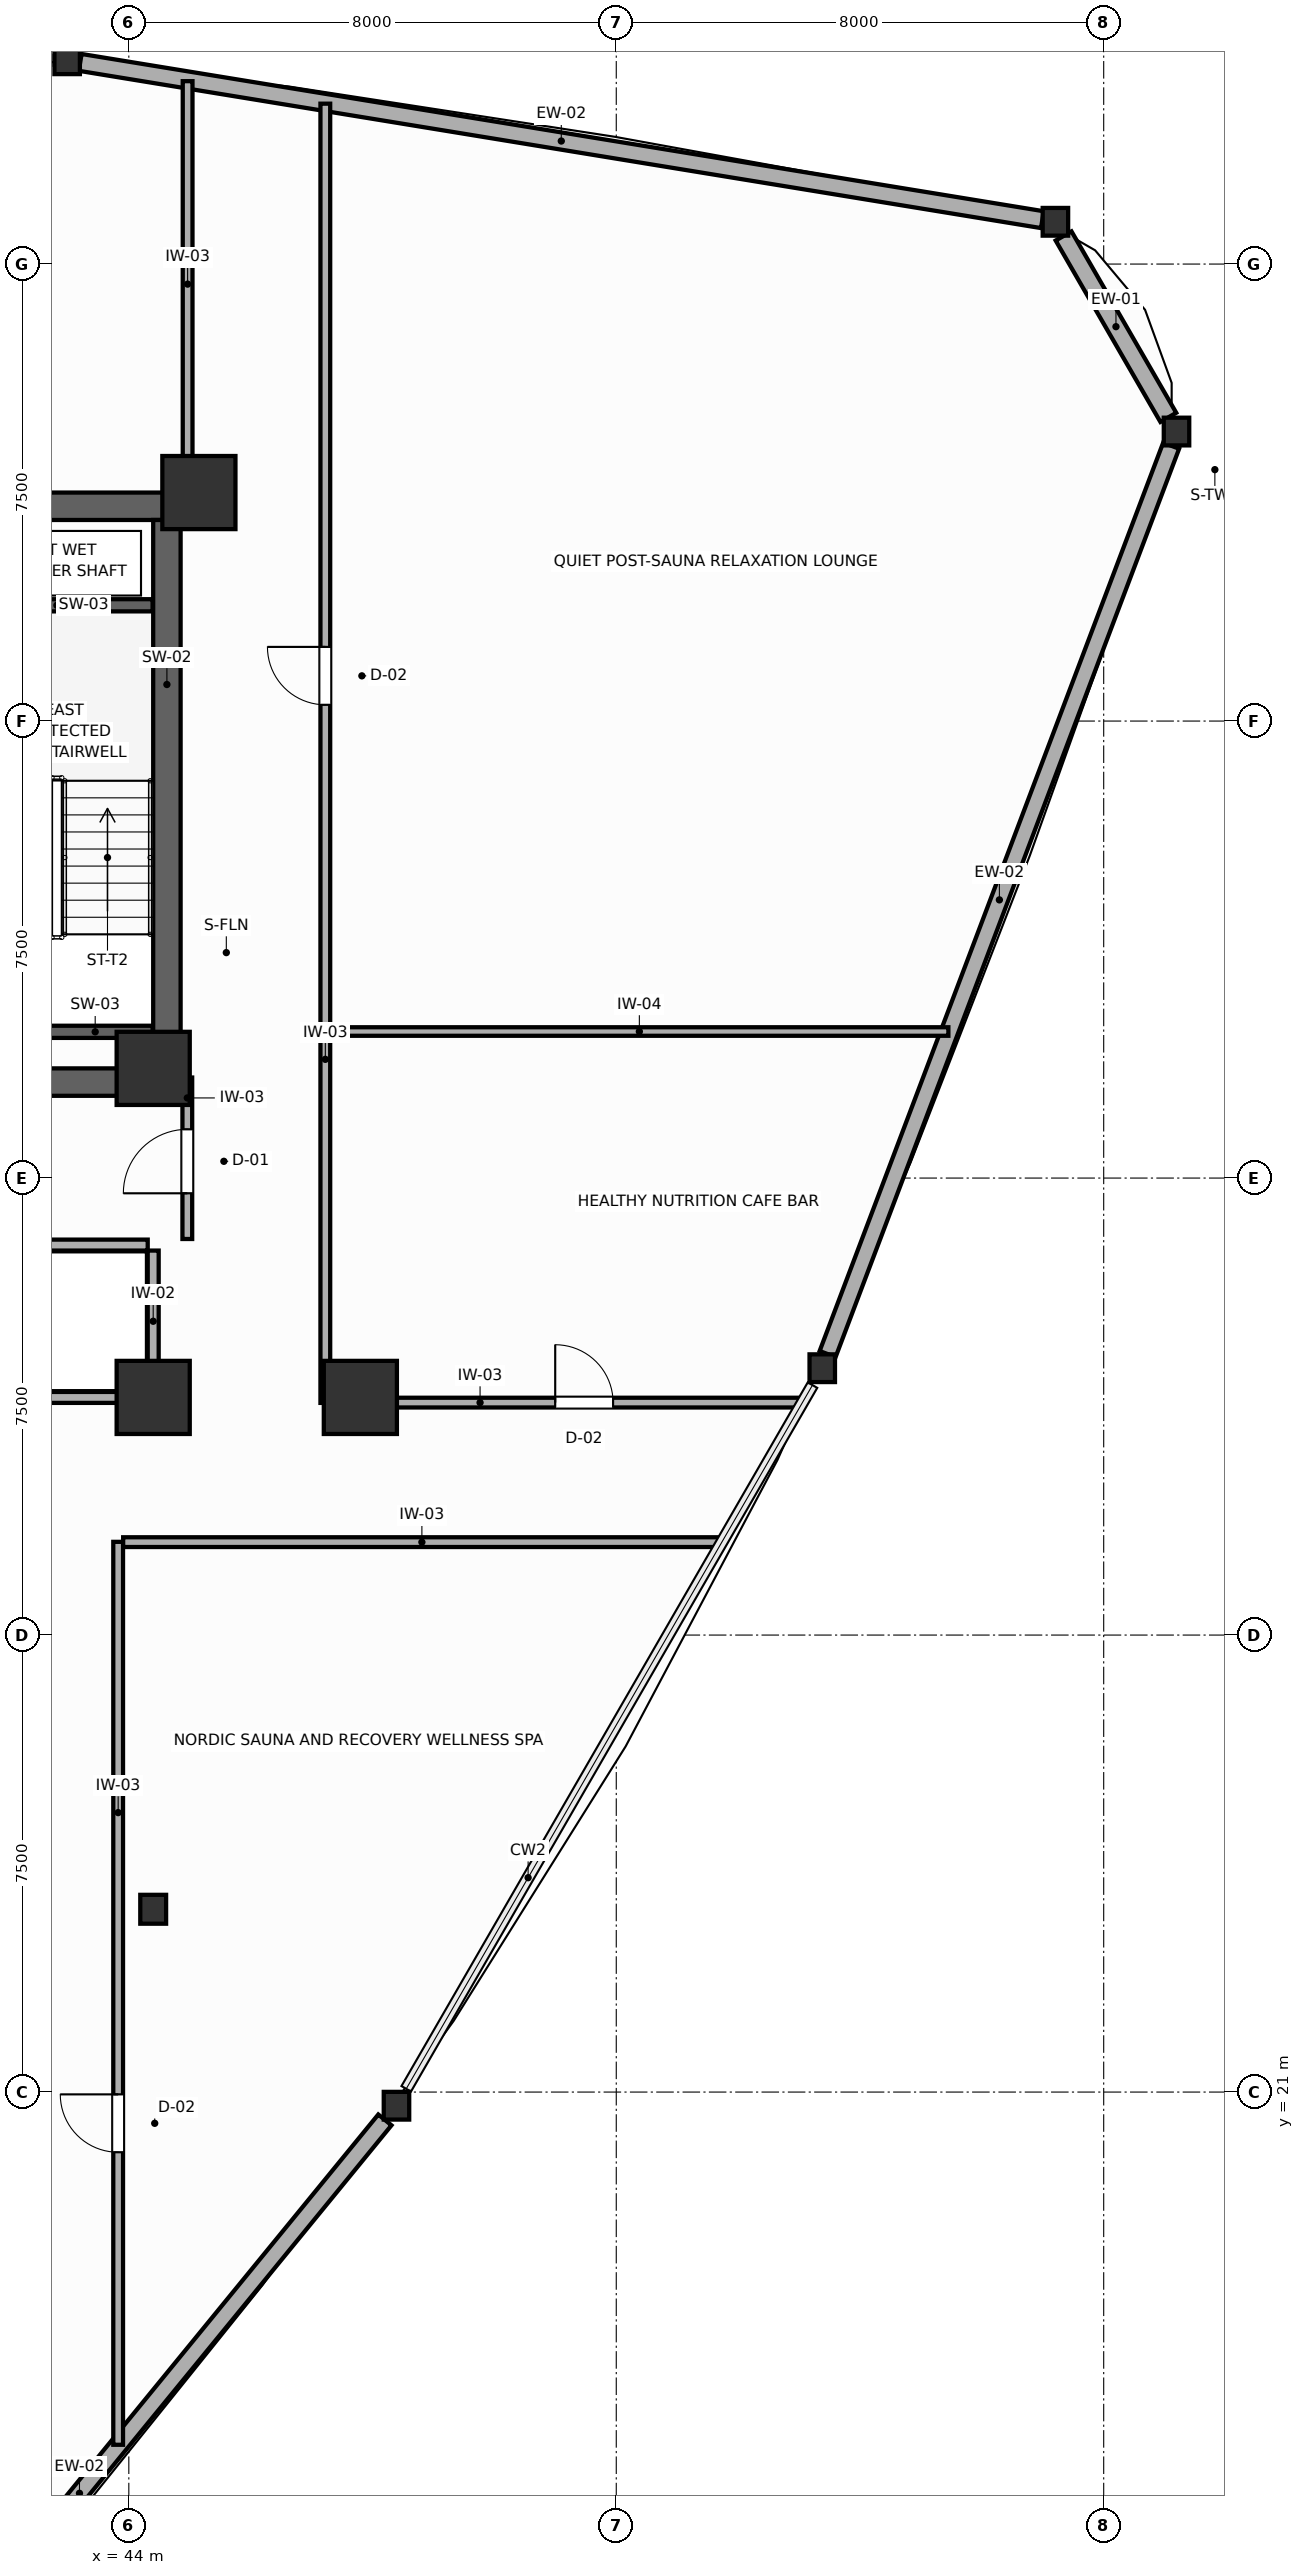
"""IFC4 building model, lengths in metres.
Left out: names, types, materials, properties, quantities, classifications, styles, units other than length and angle.
Written with IfcOpenShell. Run it as: python <this file> out.ifc"""

import sys

from ifc_helpers import new_model, si_unit, direction, frame, frame_2d, origin, origin_2d, place, context, subcontext, project, spatial, rectangle, i_section, extrude, source, transform, mapped, element, fill, save


model = new_model("IFC4")
c1 = context("Model", 3, precision=1e-05, world=origin(), true_north=direction((0.0, 1.0)))
c2 = subcontext(c1, "Body", "Model", "MODEL_VIEW")
j1 = project(units=[si_unit("LENGTHUNIT", "METRE"), si_unit("PLANEANGLEUNIT", "RADIAN")], contexts=[c1])
p1 = place(None, origin())
s1 = spatial("IfcSite", under=j1, at=p1, CompositionType="ELEMENT")
p2 = place(p1, origin())
s2 = spatial("IfcBuilding", under=s1, at=p2, CompositionType="ELEMENT")
p3 = place(p2, frame((0.0, 0.0, 117.0)))
s3 = spatial("IfcBuildingStorey", under=s2, at=p3, CompositionType="ELEMENT", Elevation=117.0)
p4 = place(p3, frame((27.15, 47.025, 0.0), z_axis=(0.0, 0.0, 1.0), x_axis=(1.0, 0.0, 0.0)))
e1 = element("IfcWall", 1, at=p4, inside=s3, PredefinedType="SHEAR", context=c2, shape_type="SweptSolid", body=[
    extrude(rectangle(XDim=17.7, YDim=0.45, at=frame_2d((8.85, 0.0))), origin(), (0.0, 0.0, 1.0), 3.6),
])
p5 = place(p3, frame((27.15, 37.575, 0.0), z_axis=(0.0, 0.0, 1.0), x_axis=(1.0, 0.0, 0.0)))
e2 = element("IfcWall", 2, at=p5, inside=s3, PredefinedType="SHEAR", context=c2, shape_type="SweptSolid", body=[
    extrude(rectangle(XDim=17.7, YDim=0.45, at=frame_2d((8.85, 0.0))), origin(), (0.0, 0.0, 1.0), 3.6),
])
p6 = place(p5, frame((4.875, 0.0, 0.0)))
e3 = element("IfcOpeningElement", 3, at=p6, cuts=e2, PredefinedType="OPENING", context=c2, shape_type="SweptSolid", body=[
    extrude(rectangle(XDim=1.05, YDim=2.1, at=frame_2d((0.525, 1.05))), frame((0.0, 0.235, 0.0), z_axis=(0.0, -1.0, 0.0), x_axis=(1.0, 0.0, 0.0)), (0.0, 0.0, 1.0), 0.47),
])
p7 = place(p5, frame((11.775, 0.0, 0.0)))
e4 = element("IfcOpeningElement", 4, at=p7, cuts=e2, PredefinedType="OPENING", context=c2, shape_type="SweptSolid", body=[
    extrude(rectangle(XDim=1.05, YDim=2.1, at=frame_2d((0.525, 1.05))), frame((0.0, 0.235, 0.0), z_axis=(0.0, -1.0, 0.0), x_axis=(1.0, 0.0, 0.0)), (0.0, 0.0, 1.0), 0.47),
])
p8 = place(p3, frame((44.625, 37.8, 0.0), z_axis=(0.0, 0.0, 1.0), x_axis=(0.0, 1.0, 0.0)))
e5 = element("IfcWall", 5, at=p8, inside=s3, PredefinedType="SHEAR", context=c2, shape_type="SweptSolid", body=[
    extrude(rectangle(XDim=9.0, YDim=0.45, at=frame_2d((4.5, 0.0))), origin(), (0.0, 0.0, 1.0), 3.6),
])
m1 = source(origin(), c2, "Body", "SweptSolid", [
    extrude(rectangle(XDim=1.2, YDim=1.2, at=origin_2d()), origin(), (0.0, 0.0, 1.0), 3.6),
])
for number, where, z_axis, x_axis in (
    (6, (45.15, 47.25, 0.0), (0.0, 0.0, 1.0), (1.0, 0.0, 0.0)),
    (7, (44.4, 37.8, 0.0), (0.0, 0.0, 1.0), (1.0, 0.0, 0.0)),
    (8, (44.4, 32.4, 0.0), (0.0, 0.0, 1.0), (1.0, 0.0, 0.0)),
    (9, (47.8, 32.4, 0.0), (0.0, 0.0, 1.0), (1.0, 0.0, 0.0)),
):
    element("IfcColumn", number, at=place(p3, frame(where, z_axis=z_axis, x_axis=x_axis)), inside=s3, PredefinedType="COLUMN", context=c2, shape_type="MappedRepresentation", body=[
        mapped(m1, transform((0.0, 0.0, 0.0), scale=1.0)),
    ])
m2 = source(origin(), c2, "Body", "SweptSolid", [
    extrude(i_section(OverallWidth=0.424, OverallDepth=0.474, WebThickness=0.045, FlangeThickness=0.072, FilletRadius=0.015, at=origin_2d()), origin(), (0.0, 0.0, 1.0), 3.6),
])
p9 = place(p3, frame((44.4, 24.0, 0.0), z_axis=(0.0, 0.0, 1.0), x_axis=(1.0, 0.0, 0.0)))
e10 = element("IfcColumn", 10, at=p9, inside=s3, PredefinedType="COLUMN", context=c2, shape_type="MappedRepresentation", body=[
    mapped(m2, transform((0.0, 0.0, 0.0), scale=1.0)),
])
m3 = source(origin(), c2, "Body", "SweptSolid", [
    extrude(i_section(OverallWidth=0.418, OverallDepth=0.455, WebThickness=0.039, FlangeThickness=0.063, FilletRadius=0.015, at=origin_2d()), origin(), (0.0, 0.0, 1.0), 3.6),
])
for number, where, z_axis, x_axis in (
    (11, (61.195, 48.251, 0.0), (0.0, 0.0, 1.0), (1.0, 0.0, 0.0)),
    (12, (59.208, 51.694, 0.0), (0.0, 0.0, 1.0), (1.0, 0.0, 0.0)),
    (13, (42.988, 54.344, 0.0), (0.0, 0.0, 1.0), (1.0, 0.0, 0.0)),
    (14, (48.393, 20.776, 0.0), (0.0, 0.0, 1.0), (1.0, 0.0, 0.0)),
    (15, (55.381, 32.879, 0.0), (0.0, 0.0, 1.0), (1.0, 0.0, 0.0)),
):
    element("IfcColumn", number, at=place(p3, frame(where, z_axis=z_axis, x_axis=x_axis)), inside=s3, PredefinedType="COLUMN", context=c2, shape_type="MappedRepresentation", body=[
        mapped(m3, transform((0.0, 0.0, 0.0), scale=1.0)),
    ])
p10 = place(p3, frame((61.061, 48.484, 0.0), z_axis=(0.0, 0.0, 1.0), x_axis=(-0.500064626416, 0.86598808849, 0.0)))
e16 = element("IfcWall", 16, at=p10, inside=s3, PredefinedType="SOLIDWALL", context=c2, shape_type="SweptSolid", body=[
    extrude(rectangle(XDim=3.438, YDim=0.3, at=frame_2d((1.719, 0.0))), origin(), (0.0, 0.0, 1.0), 1.87),
])
p11 = place(p3, frame((58.993, 51.729, 0.0), z_axis=(0.0, 0.0, 1.0), x_axis=(-0.98690696995, 0.161290522546, 0.0)))
e17 = element("IfcWall", 17, at=p11, inside=s3, PredefinedType="SOLIDWALL", context=c2, shape_type="SweptSolid", body=[
    extrude(rectangle(XDim=16.001, YDim=0.28, at=frame_2d((8.0, 0.0))), origin(), (0.0, 0.0, 1.0), 1.87),
])
p12 = place(p3, frame((38.177, 8.287, 0.0), z_axis=(0.0, 0.0, 1.0), x_axis=(0.633140387555, 0.774036982092, 0.0)))
e18 = element("IfcWall", 18, at=p12, inside=s3, PredefinedType="SOLIDWALL", context=c2, shape_type="SweptSolid", body=[
    extrude(rectangle(XDim=15.834, YDim=0.28, at=frame_2d((7.917, 0.0))), origin(), (0.0, 0.0, 1.0), 1.87),
])
p13 = place(p3, frame((55.469, 33.112, 0.0), z_axis=(0.0, 0.0, 1.0), x_axis=(0.353771130195, 0.935332019895, 0.0)))
e19 = element("IfcWall", 19, at=p13, inside=s3, PredefinedType="SOLIDWALL", context=c2, shape_type="SweptSolid", body=[
    extrude(rectangle(XDim=15.937, YDim=0.28, at=frame_2d((7.969, 0.0))), origin(), (0.0, 0.0, 1.0), 1.87),
])
for number, where, z_axis, x_axis in (
    (20, (41.25, 45.4, 0.0), (0.0, 0.0, 1.0), (1.0, 0.0, 0.0)),
    (21, (41.25, 38.4, 0.0), (0.0, 0.0, 1.0), (1.0, 0.0, 0.0)),
):
    element("IfcWall", number, at=place(p3, frame(where, z_axis=z_axis, x_axis=x_axis)), inside=s3, PredefinedType="SHEAR", context=c2, shape_type="SweptSolid", body=[
        extrude(rectangle(XDim=3.14, YDim=0.2, at=frame_2d((1.57, 0.0))), origin(), (0.0, 0.0, 1.0), 3.6),
    ])
p14 = place(p3, frame((42.39, 34.9, 0.0), z_axis=(0.0, 0.0, 1.0), x_axis=(1.0, 0.0, 0.0)))
e22 = element("IfcWall", 22, at=p14, inside=s3, PredefinedType="PARTITIONING", context=c2, shape_type="SweptSolid", body=[
    extrude(rectangle(XDim=1.92, YDim=0.18, at=frame_2d((0.96, 0.0))), origin(), (0.0, 0.0, 1.0), 3.4),
])
p15 = place(p3, frame((42.39, 32.4, 0.0), z_axis=(0.0, 0.0, 1.0), x_axis=(1.0, 0.0, 0.0)))
e23 = element("IfcWall", 23, at=p15, inside=s3, PredefinedType="PARTITIONING", context=c2, shape_type="SweptSolid", body=[
    extrude(rectangle(XDim=1.92, YDim=0.18, at=frame_2d((0.96, 0.0))), origin(), (0.0, 0.0, 1.0), 2.16),
])
p16 = place(p3, frame((44.4, 32.49, 0.0), z_axis=(0.0, 0.0, 1.0), x_axis=(0.0, 1.0, 0.0)))
e24 = element("IfcWall", 24, at=p16, inside=s3, PredefinedType="PARTITIONING", context=c2, shape_type="SweptSolid", body=[
    extrude(rectangle(XDim=2.32, YDim=0.18, at=frame_2d((1.16, 0.0))), origin(), (0.0, 0.0, 1.0), 3.4),
])
p17 = place(p3, frame((44.96, 35.0, 0.0), z_axis=(0.0, 0.0, 1.0), x_axis=(0.0, 1.0, 0.0)))
e25 = element("IfcWall", 25, at=p17, inside=s3, PredefinedType="PARTITIONING", context=c2, shape_type="SweptSolid", body=[
    extrude(rectangle(XDim=2.65, YDim=0.16, at=frame_2d((1.325, 0.0))), origin(), (0.0, 0.0, 1.0), 3.4),
])
p18 = place(p17, frame((0.75, 0.0, 0.0)))
e26 = element("IfcOpeningElement", 26, at=p18, cuts=e25, PredefinedType="OPENING", context=c2, shape_type="SweptSolid", body=[
    extrude(rectangle(XDim=1.05, YDim=2.1, at=frame_2d((0.525, 1.05))), frame((0.0, 0.09, 0.0), z_axis=(0.0, -1.0, 0.0), x_axis=(1.0, 0.0, 0.0)), (0.0, 0.0, 1.0), 0.18),
])
p19 = place(p3, frame((47.225, 32.31, 0.0), z_axis=(0.0, 0.0, 1.0), x_axis=(0.0, 1.0, 0.0)))
e27 = element("IfcWall", 27, at=p19, inside=s3, PredefinedType="PARTITIONING", context=c2, shape_type="SweptSolid", body=[
    extrude(rectangle(XDim=21.322, YDim=0.16, at=frame_2d((10.661, 0.0))), origin(), (0.0, 0.0, 1.0), 3.4),
])
p20 = place(p19, frame((11.457, 0.0, 0.0)))
e28 = element("IfcOpeningElement", 28, at=p20, cuts=e27, PredefinedType="OPENING", context=c2, shape_type="SweptSolid", body=[
    extrude(rectangle(XDim=0.95, YDim=2.05, at=frame_2d((0.475, 1.025))), frame((0.0, 0.09, 0.0), z_axis=(0.0, -1.0, 0.0), x_axis=(1.0, 0.0, 0.0)), (0.0, 0.0, 1.0), 0.18),
])
p21 = place(p3, frame((43.825, 15.212, 0.0), z_axis=(0.0, 0.0, 1.0), x_axis=(0.0, 1.0, 0.0)))
e29 = element("IfcWall", 29, at=p21, inside=s3, PredefinedType="PARTITIONING", context=c2, shape_type="SweptSolid", body=[
    extrude(rectangle(XDim=14.818, YDim=0.16, at=frame_2d((7.409, 0.0))), origin(), (0.0, 0.0, 1.0), 3.4),
])
p22 = place(p21, frame((4.801, 0.0, 0.0)))
e30 = element("IfcOpeningElement", 30, at=p22, cuts=e29, PredefinedType="OPENING", context=c2, shape_type="SweptSolid", body=[
    extrude(rectangle(XDim=0.95, YDim=2.05, at=frame_2d((0.475, 1.025))), frame((0.0, 0.09, 0.0), z_axis=(0.0, -1.0, 0.0), x_axis=(1.0, 0.0, 0.0)), (0.0, 0.0, 1.0), 0.18),
])
p23 = place(p3, frame((43.907, 30.025, 0.0), z_axis=(0.0, 0.0, 1.0), x_axis=(1.0, 0.0, 0.0)))
e31 = element("IfcWall", 31, at=p23, inside=s3, PredefinedType="PARTITIONING", context=c2, shape_type="SweptSolid", body=[
    extrude(rectangle(XDim=9.806, YDim=0.16, at=frame_2d((4.903, 0.0))), origin(), (0.0, 0.0, 1.0), 3.4),
])
p24 = place(p3, frame((47.307, 32.315, 0.0), z_axis=(0.0, 0.0, 1.0), x_axis=(1.0, 0.0, 0.0)))
e32 = element("IfcWall", 32, at=p24, inside=s3, PredefinedType="PARTITIONING", context=c2, shape_type="SweptSolid", body=[
    extrude(rectangle(XDim=7.728, YDim=0.16, at=frame_2d((3.864, 0.0))), origin(), (0.0, 0.0, 1.0), 2.16),
])
p25 = place(p24, frame((3.691, 0.0, 0.0)))
e33 = element("IfcOpeningElement", 33, at=p25, cuts=e32, PredefinedType="OPENING", context=c2, shape_type="SweptSolid", body=[
    extrude(rectangle(XDim=0.95, YDim=2.05, at=frame_2d((0.475, 1.025))), frame((0.0, 0.09, 0.0), z_axis=(0.0, -1.0, 0.0), x_axis=(1.0, 0.0, 0.0)), (0.0, 0.0, 1.0), 0.18),
])
p26 = place(p3, frame((44.965, 47.34, 0.0), z_axis=(0.0, 0.0, 1.0), x_axis=(0.0, 1.0, 0.0)))
e34 = element("IfcWall", 34, at=p26, inside=s3, PredefinedType="PARTITIONING", context=c2, shape_type="SweptSolid", body=[
    extrude(rectangle(XDim=6.661, YDim=0.16, at=frame_2d((3.331, 0.0))), origin(), (0.0, 0.0, 1.0), 2.16),
])
p27 = place(p3, frame((47.307, 38.405, 0.0), z_axis=(0.0, 0.0, 1.0), x_axis=(1.0, 0.0, 0.0)))
e35 = element("IfcWall", 35, at=p27, inside=s3, PredefinedType="PARTITIONING", context=c2, shape_type="SweptSolid", body=[
    extrude(rectangle(XDim=10.144, YDim=0.14, at=frame_2d((5.072, 0.0))), origin(), (0.0, 0.0, 1.0), 3.4),
])
p28 = place(p18, origin())
e36 = element("IfcDoor", 36, at=p28, inside=s3, OperationType="SINGLE_SWING_LEFT", PredefinedType="DOOR", context=c2, shape_type="SweptSolid", body=[
    extrude(rectangle(XDim=1.05, YDim=2.1, at=frame_2d((0.525, 1.05))), frame((0.0, 0.025, 0.0), z_axis=(0.0, -1.0, 0.0), x_axis=(1.0, 0.0, 0.0)), (0.0, 0.0, 1.0), 0.05),
])
fill(e26, e36)
p29 = place(p20, origin())
e37 = element("IfcDoor", 37, at=p29, inside=s3, OperationType="SINGLE_SWING_RIGHT", PredefinedType="DOOR", context=c2, shape_type="SweptSolid", body=[
    extrude(rectangle(XDim=0.95, YDim=2.05, at=frame_2d((0.475, 1.025))), frame((0.0, 0.025, 0.0), z_axis=(0.0, -1.0, 0.0), x_axis=(1.0, 0.0, 0.0)), (0.0, 0.0, 1.0), 0.05),
])
fill(e28, e37)
p30 = place(p22, origin())
e38 = element("IfcDoor", 38, at=p30, inside=s3, OperationType="SINGLE_SWING_RIGHT", PredefinedType="DOOR", context=c2, shape_type="SweptSolid", body=[
    extrude(rectangle(XDim=0.95, YDim=2.05, at=frame_2d((0.475, 1.025))), frame((0.0, 0.025, 0.0), z_axis=(0.0, -1.0, 0.0), x_axis=(1.0, 0.0, 0.0)), (0.0, 0.0, 1.0), 0.05),
])
fill(e30, e38)
p31 = place(p25, origin())
e39 = element("IfcDoor", 39, at=p31, inside=s3, OperationType="SINGLE_SWING_LEFT", PredefinedType="DOOR", context=c2, shape_type="SweptSolid", body=[
    extrude(rectangle(XDim=0.95, YDim=2.05, at=frame_2d((0.475, 1.025))), frame((0.0, 0.025, 0.0), z_axis=(0.0, -1.0, 0.0), x_axis=(1.0, 0.0, 0.0)), (0.0, 0.0, 1.0), 0.05),
])
fill(e33, e39)
save(model, sys.argv[1])
